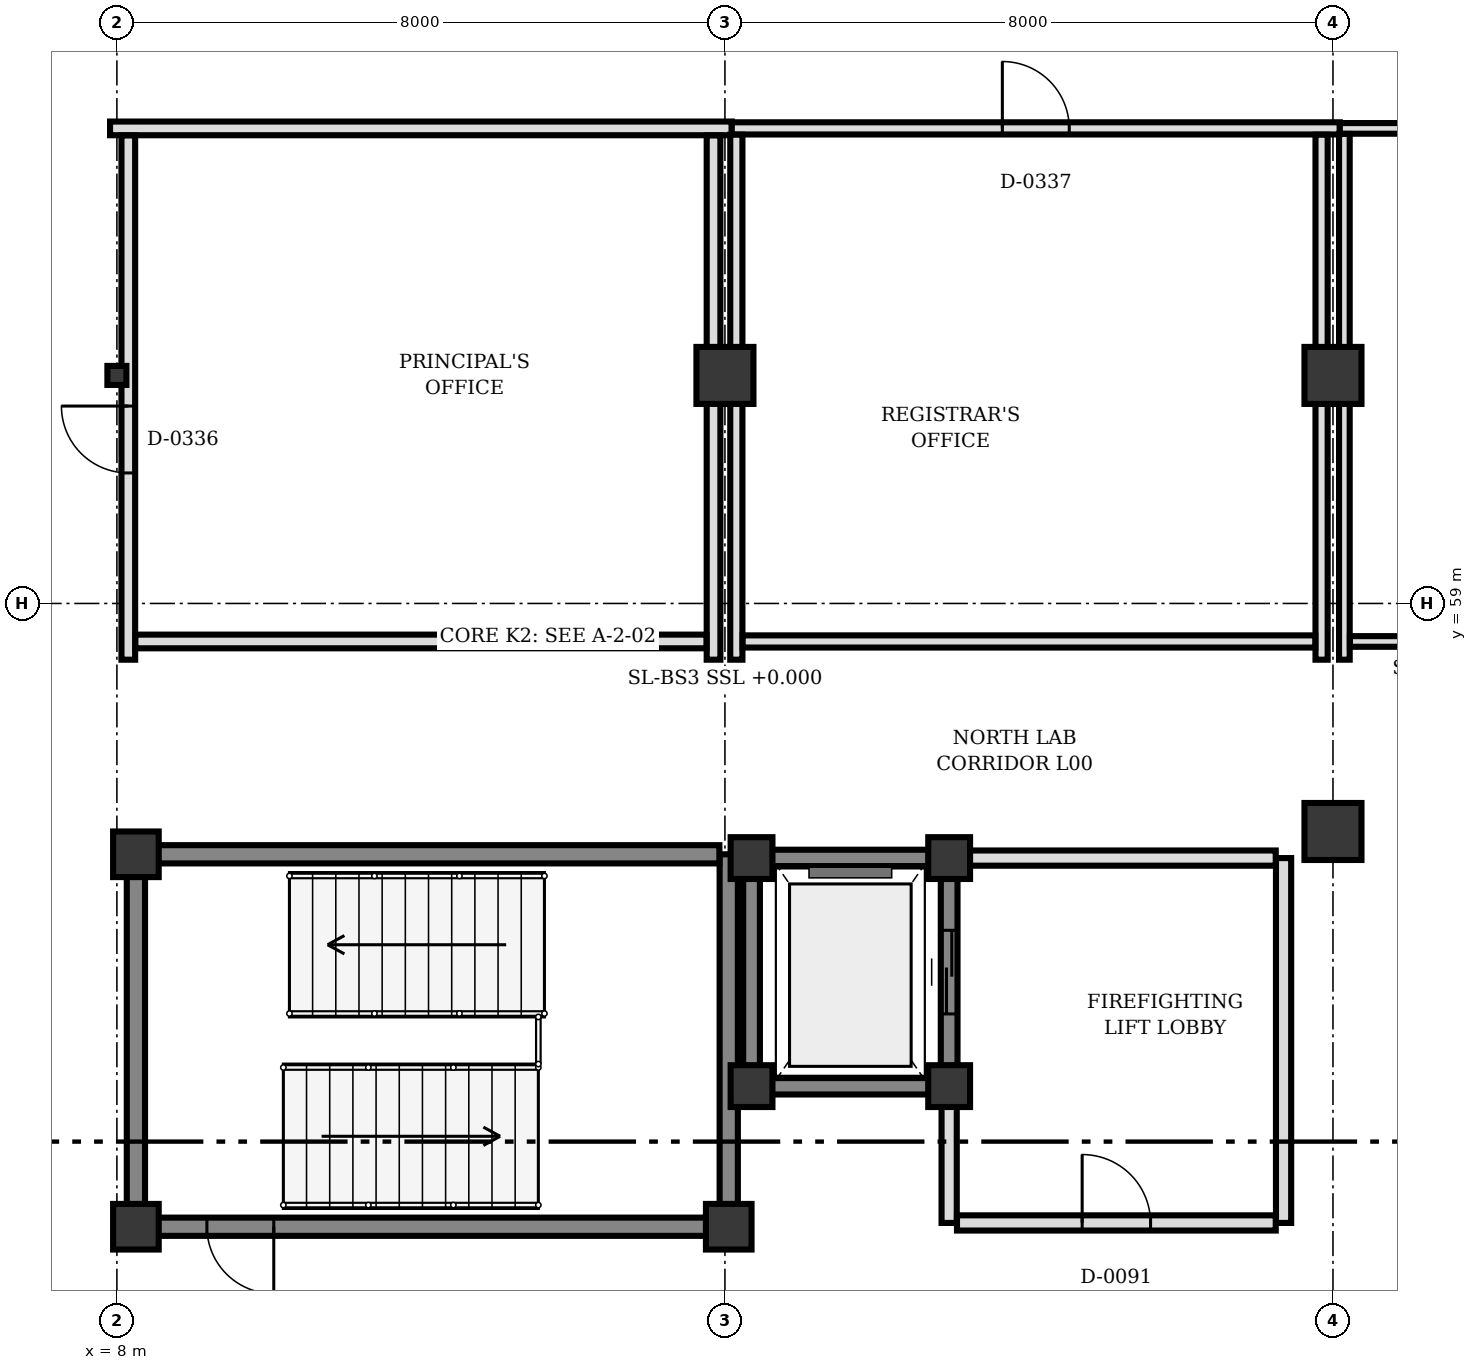
"""IFC4 building model, lengths in metres.
Left out: names, types, materials, properties, quantities, classifications, styles, units other than length and angle.
Written with IfcOpenShell. Run it as: python <this file> out.ifc"""

import sys

from ifc_helpers import new_model, si_unit, direction, frame, frame_2d, origin, origin_2d, place, context, subcontext, project, spatial, rectangle, hollow_rectangle, extrude, element, fill, save


model = new_model("IFC4")
c1 = context("Model", 3, precision=1e-05, world=origin(), true_north=direction((0.0, 1.0)))
c2 = subcontext(c1, "Body", "Model", "MODEL_VIEW")
j1 = project(units=[si_unit("LENGTHUNIT", "METRE"), si_unit("PLANEANGLEUNIT", "RADIAN")], contexts=[c1])
p1 = place(None, origin())
s1 = spatial("IfcSite", under=j1, at=p1, CompositionType="ELEMENT")
p2 = place(p1, origin())
s2 = spatial("IfcBuilding", under=s1, at=p2, CompositionType="ELEMENT")
p3 = place(p2, origin())
s3 = spatial("IfcBuildingStorey", under=s2, at=p3, CompositionType="ELEMENT", Elevation=0.0)
for number, where, z_axis, x_axis in (
    (1, (8.25, 50.8, 0.0), (0.0, 0.0, 1.0), (1.0, 0.0, 0.0)),
    (2, (16.05, 50.8, 0.0), (0.0, 0.0, 1.0), (1.0, 0.0, 0.0)),
    (3, (8.25, 55.7, 0.0), (0.0, 0.0, 1.0), (1.0, 0.0, 0.0)),
):
    element("IfcColumn", number, at=place(p3, frame(where, z_axis=z_axis, x_axis=x_axis)), inside=s3, PredefinedType="COLUMN", context=c2, shape_type="SweptSolid", body=[
        extrude(rectangle(XDim=0.6, YDim=0.6, at=origin_2d()), origin(), (0.0, 0.0, 1.0), 4.5),
    ])
for number, where, z_axis, x_axis in (
    (4, (16.35, 52.65, 0.0), (0.0, 0.0, 1.0), (1.0, 0.0, 0.0)),
    (5, (18.95, 52.65, 0.0), (0.0, 0.0, 1.0), (1.0, 0.0, 0.0)),
    (6, (18.95, 55.65, 0.0), (0.0, 0.0, 1.0), (1.0, 0.0, 0.0)),
    (7, (16.35, 55.65, 0.0), (0.0, 0.0, 1.0), (1.0, 0.0, 0.0)),
):
    element("IfcColumn", number, at=place(p3, frame(where, z_axis=z_axis, x_axis=x_axis)), inside=s3, PredefinedType="COLUMN", context=c2, shape_type="SweptSolid", body=[
        extrude(rectangle(XDim=0.55, YDim=0.55, at=origin_2d()), origin(), (0.0, 0.0, 1.0), 4.5),
    ])
for number, where, z_axis, x_axis in (
    (8, (16.0, 62.0, 0.0), (0.0, 0.0, 1.0), (1.0, 0.0, 0.0)),
    (9, (24.0, 56.0, 0.0), (0.0, 0.0, 1.0), (1.0, 0.0, 0.0)),
    (10, (24.0, 62.0, 0.0), (0.0, 0.0, 1.0), (1.0, 0.0, 0.0)),
):
    element("IfcColumn", number, at=place(p3, frame(where, z_axis=z_axis, x_axis=x_axis)), inside=s3, PredefinedType="COLUMN", context=c2, shape_type="SweptSolid", body=[
        extrude(rectangle(XDim=0.75, YDim=0.75, at=origin_2d()), origin(), (0.0, 0.0, 1.0), 4.5),
    ])
p4 = place(p3, frame((8.0, 62.0, 0.0), z_axis=(0.0, 0.0, 1.0), x_axis=(1.0, 0.0, 0.0)))
e11 = element("IfcColumn", 11, at=p4, inside=s3, PredefinedType="COLUMN", context=c2, shape_type="SweptSolid", body=[
    extrude(hollow_rectangle(XDim=0.25, YDim=0.25, WallThickness=0.01, at=origin_2d()), origin(), (0.0, 0.0, 1.0), 4.5),
])
p5 = place(p3, frame((8.25, 51.092, 0.0), z_axis=(0.0, 0.0, 1.0), x_axis=(0.0, 1.0, 0.0)))
e12 = element("IfcWall", 12, at=p5, inside=s3, PredefinedType="SHEAR", context=c2, shape_type="SweptSolid", body=[
    extrude(rectangle(XDim=4.316, YDim=0.24, at=frame_2d((2.158, 0.0))), origin(), (0.0, 0.0, 1.0), 4.24),
])
p6 = place(p3, frame((16.05, 55.7, 0.0), z_axis=(0.0, 0.0, 1.0), x_axis=(0.0, -1.0, 0.0)))
e13 = element("IfcWall", 13, at=p6, inside=s3, PredefinedType="SHEAR", context=c2, shape_type="SweptSolid", body=[
    extrude(rectangle(XDim=4.608, YDim=0.24, at=frame_2d((2.304, 0.0))), origin(), (0.0, 0.0, 1.0), 4.24),
])
p7 = place(p3, frame((15.758, 50.8, 0.0), z_axis=(0.0, 0.0, 1.0), x_axis=(-1.0, 0.0, 0.0)))
e14 = element("IfcWall", 14, at=p7, inside=s3, PredefinedType="SHEAR", context=c2, shape_type="SweptSolid", body=[
    extrude(rectangle(XDim=7.216, YDim=0.24, at=frame_2d((3.608, 0.0))), origin(), (0.0, 0.0, 1.0), 4.24),
])
p8 = place(p7, frame((5.694, 0.0, 0.0)))
e15 = element("IfcOpeningElement", 15, at=p8, cuts=e14, PredefinedType="OPENING", context=c2, shape_type="SweptSolid", body=[
    extrude(rectangle(XDim=0.88, YDim=2.1, at=frame_2d((0.44, 1.05))), frame((0.0, 0.13, 0.0), z_axis=(0.0, -1.0, 0.0), x_axis=(1.0, 0.0, 0.0)), (0.0, 0.0, 1.0), 0.26),
])
p9 = place(p3, frame((15.927, 55.7, 0.0), z_axis=(0.0, 0.0, 1.0), x_axis=(-1.0, 0.0, 0.0)))
e16 = element("IfcWall", 16, at=p9, inside=s3, PredefinedType="SHEAR", context=c2, shape_type="SweptSolid", body=[
    extrude(rectangle(XDim=7.385, YDim=0.24, at=frame_2d((3.692, 0.0))), origin(), (0.0, 0.0, 1.0), 4.24),
])
p10 = place(p3, frame((16.617, 52.65, 0.0), z_axis=(0.0, 0.0, 1.0), x_axis=(1.0, 0.0, 0.0)))
e17 = element("IfcWall", 17, at=p10, inside=s3, PredefinedType="SHEAR", context=c2, shape_type="SweptSolid", body=[
    extrude(rectangle(XDim=2.066, YDim=0.22, at=frame_2d((1.033, 0.0))), origin(), (0.0, 0.0, 1.0), 4.24),
])
p11 = place(p3, frame((18.95, 52.917, 0.0), z_axis=(0.0, 0.0, 1.0), x_axis=(0.0, 1.0, 0.0)))
e18 = element("IfcWall", 18, at=p11, inside=s3, PredefinedType="SHEAR", context=c2, shape_type="SweptSolid", body=[
    extrude(rectangle(XDim=2.466, YDim=0.22, at=frame_2d((1.233, 0.0))), origin(), (0.0, 0.0, 1.0), 4.24),
])
p12 = place(p11, frame((0.683, 0.0, 0.0)))
e19 = element("IfcOpeningElement", 19, at=p12, cuts=e18, PredefinedType="OPENING", context=c2, shape_type="SweptSolid", body=[
    extrude(rectangle(XDim=1.1, YDim=2.15, at=frame_2d((0.55, 1.075))), frame((0.0, 0.12, 0.0), z_axis=(0.0, -1.0, 0.0), x_axis=(1.0, 0.0, 0.0)), (0.0, 0.0, 1.0), 0.24),
])
p13 = place(p3, frame((18.683, 55.65, 0.0), z_axis=(0.0, 0.0, 1.0), x_axis=(-1.0, 0.0, 0.0)))
e20 = element("IfcWall", 20, at=p13, inside=s3, PredefinedType="SHEAR", context=c2, shape_type="SweptSolid", body=[
    extrude(rectangle(XDim=2.066, YDim=0.22, at=frame_2d((1.033, 0.0))), origin(), (0.0, 0.0, 1.0), 4.24),
])
p14 = place(p3, frame((16.35, 55.383, 0.0), z_axis=(0.0, 0.0, 1.0), x_axis=(0.0, -1.0, 0.0)))
e21 = element("IfcWall", 21, at=p14, inside=s3, PredefinedType="SHEAR", context=c2, shape_type="SweptSolid", body=[
    extrude(rectangle(XDim=2.466, YDim=0.22, at=frame_2d((1.233, 0.0))), origin(), (0.0, 0.0, 1.0), 4.24),
])
p15 = place(p3, frame((18.95, 50.85, 0.0), z_axis=(0.0, 0.0, 1.0), x_axis=(0.0, 1.0, 0.0)))
e22 = element("IfcWall", 22, at=p15, inside=s3, PredefinedType="PARTITIONING", context=c2, shape_type="SweptSolid", body=[
    extrude(rectangle(XDim=1.533, YDim=0.2, at=frame_2d((0.767, 0.0))), origin(), (0.0, 0.0, 1.0), 4.2),
])
p16 = place(p3, frame((23.35, 50.85, 0.0), z_axis=(0.0, 0.0, 1.0), x_axis=(0.0, 1.0, 0.0)))
e23 = element("IfcWall", 23, at=p16, inside=s3, PredefinedType="PARTITIONING", context=c2, shape_type="SweptSolid", body=[
    extrude(rectangle(XDim=4.8, YDim=0.2, at=frame_2d((2.4, 0.0))), origin(), (0.0, 0.0, 1.0), 4.2),
])
p17 = place(p3, frame((19.217, 55.65, 0.0), z_axis=(0.0, 0.0, 1.0), x_axis=(1.0, 0.0, 0.0)))
e24 = element("IfcWall", 24, at=p17, inside=s3, PredefinedType="PARTITIONING", context=c2, shape_type="SweptSolid", body=[
    extrude(rectangle(XDim=4.03, YDim=0.2, at=frame_2d((2.015, 0.0))), origin(), (0.0, 0.0, 1.0), 4.2),
])
p18 = place(p3, frame((19.053, 50.85, 0.0), z_axis=(0.0, 0.0, 1.0), x_axis=(1.0, 0.0, 0.0)))
e25 = element("IfcWall", 25, at=p18, inside=s3, PredefinedType="PARTITIONING", context=c2, shape_type="SweptSolid", body=[
    extrude(rectangle(XDim=4.194, YDim=0.2, at=frame_2d((2.097, 0.0))), origin(), (0.0, 0.0, 1.0), 4.2),
])
p19 = place(p18, frame((1.647, 0.0, 0.0)))
e26 = element("IfcOpeningElement", 26, at=p19, cuts=e25, PredefinedType="OPENING", context=c2, shape_type="SweptSolid", body=[
    extrude(rectangle(XDim=0.9, YDim=2.2, at=frame_2d((0.45, 1.1))), frame((0.0, 0.11, 0.0), z_axis=(0.0, -1.0, 0.0), x_axis=(1.0, 0.0, 0.0)), (0.0, 0.0, 1.0), 0.22),
])
p20 = place(p3, frame((7.91, 65.25, 0.0), z_axis=(0.0, 0.0, 1.0), x_axis=(1.0, 0.0, 0.0)))
e27 = element("IfcWall", 27, at=p20, inside=s3, PredefinedType="PARTITIONING", context=c2, shape_type="SweptSolid", body=[
    extrude(rectangle(XDim=8.18, YDim=0.18, at=frame_2d((4.09, 0.0))), origin(), (0.0, 0.0, 1.0), 3.532),
])
p21 = place(p3, frame((15.85, 65.157, 0.0), z_axis=(0.0, 0.0, 1.0), x_axis=(0.0, -1.0, 0.0)))
e28 = element("IfcWall", 28, at=p21, inside=s3, PredefinedType="PARTITIONING", context=c2, shape_type="SweptSolid", body=[
    extrude(rectangle(XDim=2.79, YDim=0.18, at=frame_2d((1.395, 0.0))), origin(), (0.0, 0.0, 1.0), 3.632),
])
p22 = place(p3, frame((15.85, 61.633, 0.0), z_axis=(0.0, 0.0, 1.0), x_axis=(0.0, -1.0, 0.0)))
e29 = element("IfcWall", 29, at=p22, inside=s3, PredefinedType="PARTITIONING", context=c2, shape_type="SweptSolid", body=[
    extrude(rectangle(XDim=3.373, YDim=0.18, at=frame_2d((1.687, 0.0))), origin(), (0.0, 0.0, 1.0), 4.2),
])
p23 = place(p3, frame((8.15, 58.26, 0.0), z_axis=(0.0, 0.0, 1.0), x_axis=(0.0, 1.0, 0.0)))
e30 = element("IfcWall", 30, at=p23, inside=s3, PredefinedType="PARTITIONING", context=c2, shape_type="SweptSolid", body=[
    extrude(rectangle(XDim=6.897, YDim=0.18, at=frame_2d((3.448, 0.0))), origin(), (0.0, 0.0, 1.0), 3.382),
])
p24 = place(p23, frame((2.457, 0.0, 0.0)))
e31 = element("IfcOpeningElement", 31, at=p24, cuts=e30, PredefinedType="OPENING", context=c2, shape_type="SweptSolid", body=[
    extrude(rectangle(XDim=0.88, YDim=2.1, at=frame_2d((0.44, 1.05))), frame((0.0, 0.1, 0.0), z_axis=(0.0, -1.0, 0.0), x_axis=(1.0, 0.0, 0.0)), (0.0, 0.0, 1.0), 0.2),
])
p25 = place(p3, frame((15.757, 58.5, 0.0), z_axis=(0.0, 0.0, 1.0), x_axis=(-1.0, 0.0, 0.0)))
e32 = element("IfcWall", 32, at=p25, inside=s3, PredefinedType="PARTITIONING", context=c2, shape_type="SweptSolid", body=[
    extrude(rectangle(XDim=7.514, YDim=0.18, at=frame_2d((3.757, 0.0))), origin(), (0.0, 0.0, 1.0), 4.2),
])
p26 = place(p3, frame((16.09, 65.25, 0.0), z_axis=(0.0, 0.0, 1.0), x_axis=(1.0, 0.0, 0.0)))
e33 = element("IfcWall", 33, at=p26, inside=s3, PredefinedType="PARTITIONING", context=c2, shape_type="SweptSolid", body=[
    extrude(rectangle(XDim=8.0, YDim=0.16, at=frame_2d((4.0, 0.0))), origin(), (0.0, 0.0, 1.0), 3.532),
])
p27 = place(p26, frame((3.56, 0.0, 0.0)))
e34 = element("IfcOpeningElement", 34, at=p27, cuts=e33, PredefinedType="OPENING", context=c2, shape_type="SweptSolid", body=[
    extrude(rectangle(XDim=0.88, YDim=2.1, at=frame_2d((0.44, 1.05))), frame((0.0, 0.09, 0.0), z_axis=(0.0, -1.0, 0.0), x_axis=(1.0, 0.0, 0.0)), (0.0, 0.0, 1.0), 0.18),
])
p28 = place(p3, frame((23.85, 65.167, 0.0), z_axis=(0.0, 0.0, 1.0), x_axis=(0.0, -1.0, 0.0)))
e35 = element("IfcWall", 35, at=p28, inside=s3, PredefinedType="PARTITIONING", context=c2, shape_type="SweptSolid", body=[
    extrude(rectangle(XDim=2.8, YDim=0.16, at=frame_2d((1.4, 0.0))), origin(), (0.0, 0.0, 1.0), 3.532),
])
p29 = place(p3, frame((23.85, 61.633, 0.0), z_axis=(0.0, 0.0, 1.0), x_axis=(0.0, -1.0, 0.0)))
e36 = element("IfcWall", 36, at=p29, inside=s3, PredefinedType="PARTITIONING", context=c2, shape_type="SweptSolid", body=[
    extrude(rectangle(XDim=3.373, YDim=0.16, at=frame_2d((1.687, 0.0))), origin(), (0.0, 0.0, 1.0), 3.532),
])
p30 = place(p3, frame((16.15, 58.26, 0.0), z_axis=(0.0, 0.0, 1.0), x_axis=(0.0, 1.0, 0.0)))
e37 = element("IfcWall", 37, at=p30, inside=s3, PredefinedType="PARTITIONING", context=c2, shape_type="SweptSolid", body=[
    extrude(rectangle(XDim=3.373, YDim=0.16, at=frame_2d((1.687, 0.0))), origin(), (0.0, 0.0, 1.0), 4.2),
])
p31 = place(p3, frame((16.15, 62.367, 0.0), z_axis=(0.0, 0.0, 1.0), x_axis=(0.0, 1.0, 0.0)))
e38 = element("IfcWall", 38, at=p31, inside=s3, PredefinedType="PARTITIONING", context=c2, shape_type="SweptSolid", body=[
    extrude(rectangle(XDim=2.8, YDim=0.16, at=frame_2d((1.4, 0.0))), origin(), (0.0, 0.0, 1.0), 3.632),
])
p32 = place(p3, frame((23.767, 58.5, 0.0), z_axis=(0.0, 0.0, 1.0), x_axis=(-1.0, 0.0, 0.0)))
e39 = element("IfcWall", 39, at=p32, inside=s3, PredefinedType="PARTITIONING", context=c2, shape_type="SweptSolid", body=[
    extrude(rectangle(XDim=7.534, YDim=0.16, at=frame_2d((3.767, 0.0))), origin(), (0.0, 0.0, 1.0), 3.532),
])
p33 = place(p3, frame((24.09, 65.25, 0.0), z_axis=(0.0, 0.0, 1.0), x_axis=(1.0, 0.0, 0.0)))
e40 = element("IfcWall", 40, at=p33, inside=s3, PredefinedType="PARTITIONING", context=c2, shape_type="SweptSolid", body=[
    extrude(rectangle(XDim=7.767, YDim=0.14, at=frame_2d((3.883, 0.0))), origin(), (0.0, 0.0, 1.0), 3.532),
])
p34 = place(p33, frame((3.443, 0.0, 0.0)))
e41 = element("IfcOpeningElement", 41, at=p34, cuts=e40, PredefinedType="OPENING", context=c2, shape_type="SweptSolid", body=[
    extrude(rectangle(XDim=0.88, YDim=2.1, at=frame_2d((0.44, 1.05))), frame((0.0, 0.08, 0.0), z_axis=(0.0, -1.0, 0.0), x_axis=(1.0, 0.0, 0.0)), (0.0, 0.0, 1.0), 0.16),
])
p35 = place(p3, frame((24.15, 58.26, 0.0), z_axis=(0.0, 0.0, 1.0), x_axis=(0.0, 1.0, 0.0)))
e42 = element("IfcWall", 42, at=p35, inside=s3, PredefinedType="PARTITIONING", context=c2, shape_type="SweptSolid", body=[
    extrude(rectangle(XDim=3.373, YDim=0.14, at=frame_2d((1.687, 0.0))), origin(), (0.0, 0.0, 1.0), 3.532),
])
p36 = place(p3, frame((24.15, 62.367, 0.0), z_axis=(0.0, 0.0, 1.0), x_axis=(0.0, 1.0, 0.0)))
e43 = element("IfcWall", 43, at=p36, inside=s3, PredefinedType="PARTITIONING", context=c2, shape_type="SweptSolid", body=[
    extrude(rectangle(XDim=2.81, YDim=0.14, at=frame_2d((1.405, 0.0))), origin(), (0.0, 0.0, 1.0), 3.532),
])
p37 = place(p3, frame((31.857, 58.5, 0.0), z_axis=(0.0, 0.0, 1.0), x_axis=(-1.0, 0.0, 0.0)))
e44 = element("IfcWall", 44, at=p37, inside=s3, PredefinedType="PARTITIONING", context=c2, shape_type="SweptSolid", body=[
    extrude(rectangle(XDim=7.634, YDim=0.14, at=frame_2d((3.817, 0.0))), origin(), (0.0, 0.0, 1.0), 3.532),
])
p38 = place(p8, origin())
e45 = element("IfcDoor", 45, at=p38, inside=s3, OperationType="SINGLE_SWING_LEFT", PredefinedType="DOOR", context=c2, shape_type="SweptSolid", body=[
    extrude(rectangle(XDim=0.88, YDim=2.1, at=frame_2d((0.44, 1.05))), frame((0.0, 0.025, 0.0), z_axis=(0.0, -1.0, 0.0), x_axis=(1.0, 0.0, 0.0)), (0.0, 0.0, 1.0), 0.05),
])
fill(e15, e45)
p39 = place(p12, origin())
e46 = element("IfcDoor", 46, at=p39, inside=s3, OperationType="DOUBLE_DOOR_SLIDING", PredefinedType="DOOR", context=c2, shape_type="SweptSolid", body=[
    extrude(rectangle(XDim=1.1, YDim=2.15, at=frame_2d((0.55, 1.075))), frame((0.0, 0.025, 0.0), z_axis=(0.0, -1.0, 0.0), x_axis=(1.0, 0.0, 0.0)), (0.0, 0.0, 1.0), 0.05),
])
fill(e19, e46)
p40 = place(p19, origin())
e47 = element("IfcDoor", 47, at=p40, inside=s3, OperationType="SINGLE_SWING_LEFT", PredefinedType="DOOR", context=c2, shape_type="SweptSolid", body=[
    extrude(rectangle(XDim=0.9, YDim=2.2, at=frame_2d((0.45, 1.1))), frame((0.0, 0.025, 0.0), z_axis=(0.0, -1.0, 0.0), x_axis=(1.0, 0.0, 0.0)), (0.0, 0.0, 1.0), 0.05),
])
fill(e26, e47)
p41 = place(p24, origin())
e48 = element("IfcDoor", 48, at=p41, inside=s3, OperationType="SINGLE_SWING_RIGHT", PredefinedType="DOOR", context=c2, shape_type="SweptSolid", body=[
    extrude(rectangle(XDim=0.88, YDim=2.1, at=frame_2d((0.44, 1.05))), frame((0.0, 0.025, 0.0), z_axis=(0.0, -1.0, 0.0), x_axis=(1.0, 0.0, 0.0)), (0.0, 0.0, 1.0), 0.05),
])
fill(e31, e48)
p42 = place(p27, origin())
e49 = element("IfcDoor", 49, at=p42, inside=s3, OperationType="SINGLE_SWING_LEFT", PredefinedType="DOOR", context=c2, shape_type="SweptSolid", body=[
    extrude(rectangle(XDim=0.88, YDim=2.1, at=frame_2d((0.44, 1.05))), frame((0.0, 0.025, 0.0), z_axis=(0.0, -1.0, 0.0), x_axis=(1.0, 0.0, 0.0)), (0.0, 0.0, 1.0), 0.05),
])
fill(e34, e49)
save(model, sys.argv[1])
